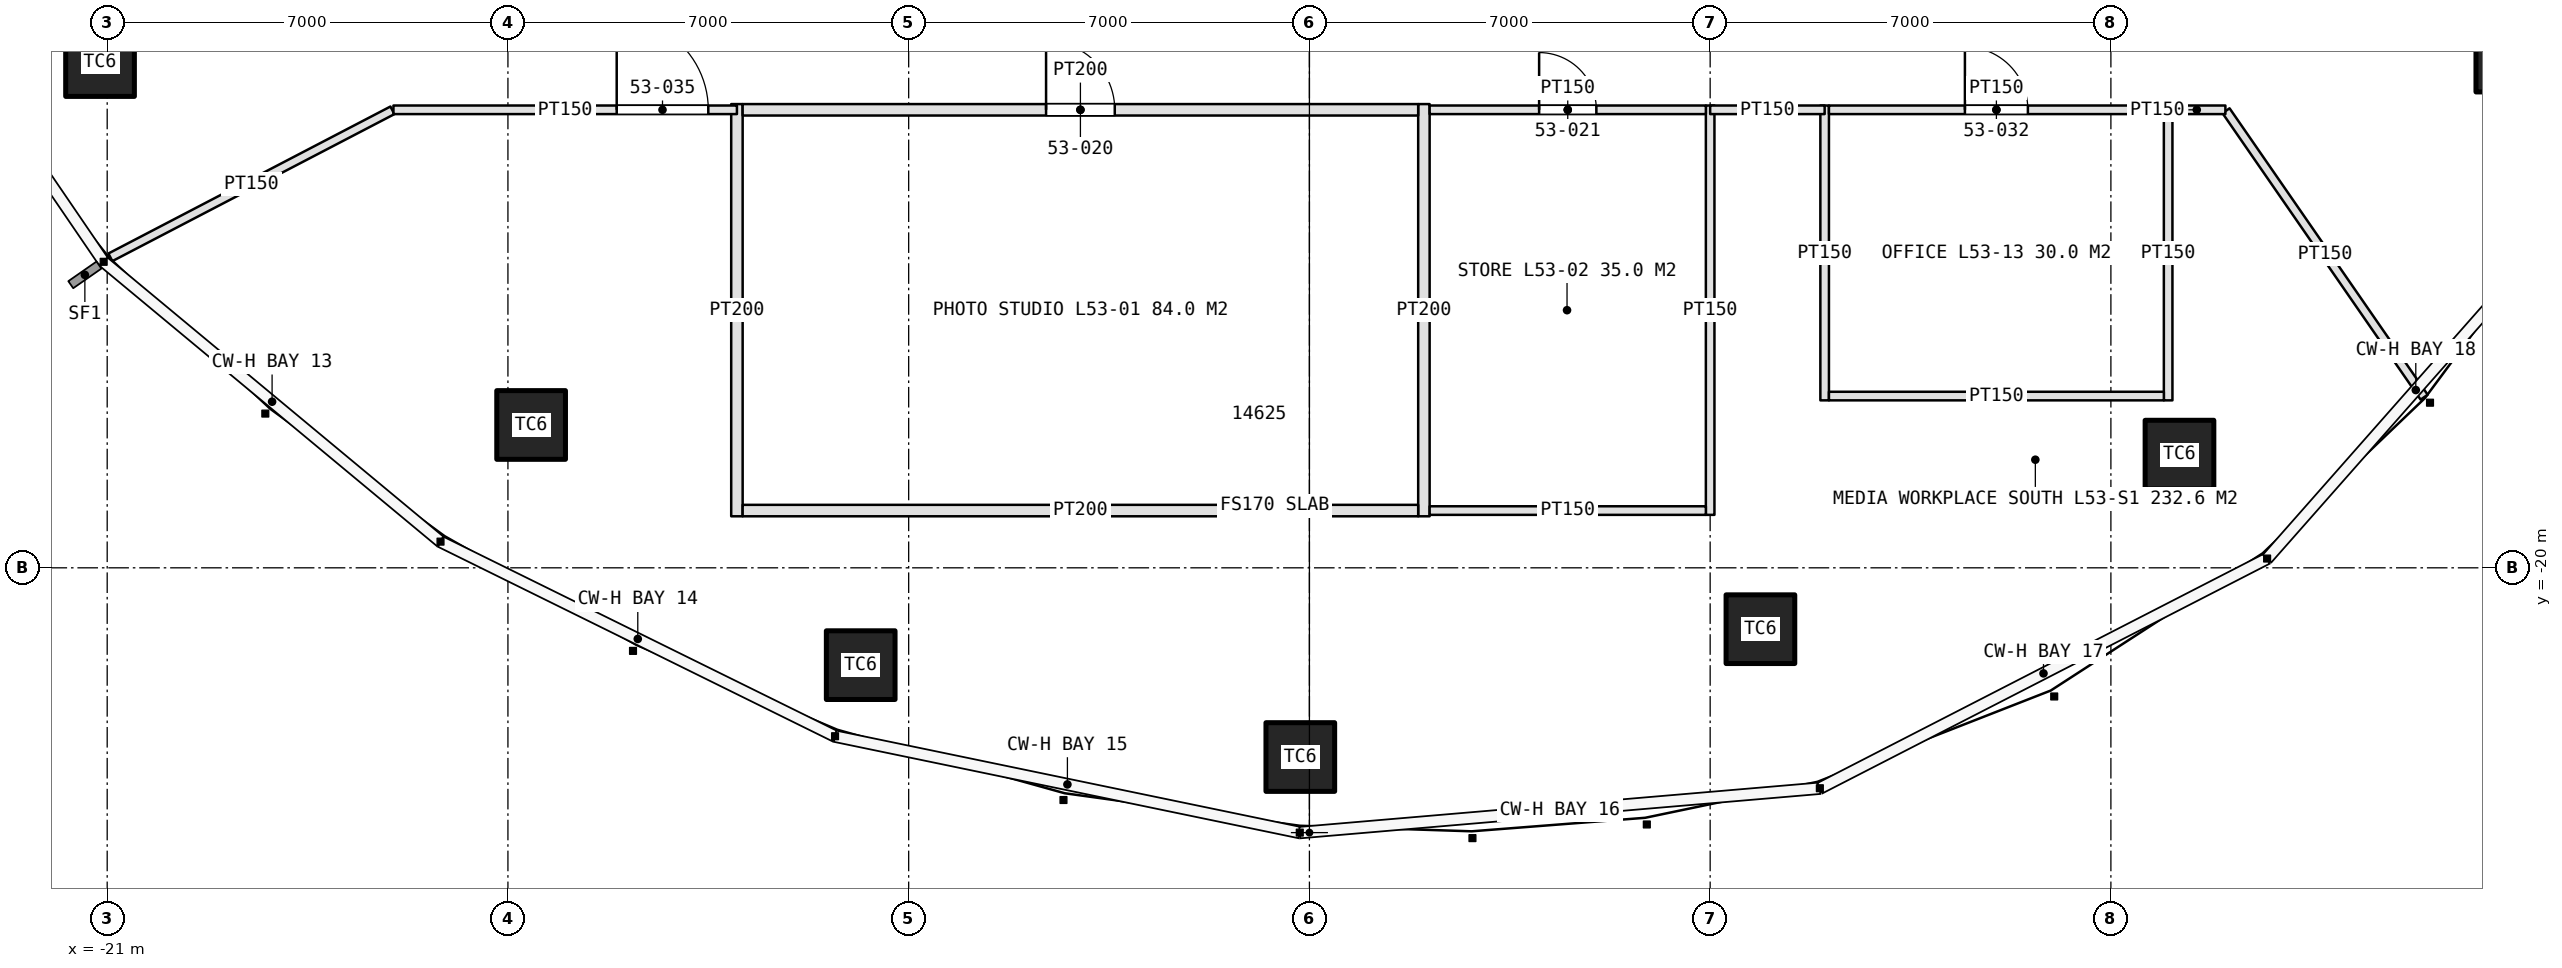
"""IFC4 building model, lengths in metres.
Left out: names, types, materials, properties, quantities, classifications, styles, units other than length and angle.
Written with IfcOpenShell. Run it as: python <this file> out.ifc"""

import sys

from ifc_helpers import new_model, si_unit, direction, frame, frame_2d, origin, origin_2d, place, context, subcontext, project, spatial, rectangle, extrude, element, fill, save


model = new_model("IFC4")
c1 = context("Model", 3, precision=1e-05, world=origin(), true_north=direction((0.0, 1.0)))
c2 = subcontext(c1, "Body", "Model", "MODEL_VIEW")
j1 = project(units=[si_unit("LENGTHUNIT", "METRE"), si_unit("PLANEANGLEUNIT", "RADIAN")], contexts=[c1])
p1 = place(None, origin())
s1 = spatial("IfcSite", under=j1, at=p1, CompositionType="ELEMENT")
p2 = place(p1, origin())
s2 = spatial("IfcBuilding", under=s1, at=p2, CompositionType="ELEMENT")
p3 = place(p2, frame((0.0, 0.0, 241.0)))
s3 = spatial("IfcBuildingStorey", under=s2, at=p3, CompositionType="ELEMENT", Elevation=241.0)
for number, where, z_axis, x_axis in (
    (1, (-21.125, -11.166, 0.0), (0.0, 0.0, 1.0), (1.0, 0.0, 0.0)),
    (2, (-13.595, -17.505, 0.0), (0.0, 0.0, 1.0), (1.0, 0.0, 0.0)),
    (3, (-7.838, -21.7, 0.0), (0.0, 0.0, 1.0), (1.0, 0.0, 0.0)),
    (4, (-0.159, -23.305, 0.0), (0.0, 0.0, 1.0), (1.0, 0.0, 0.0)),
    (5, (7.878, -21.072, 0.0), (0.0, 0.0, 1.0), (1.0, 0.0, 0.0)),
    (6, (15.198, -18.023, 0.0), (0.0, 0.0, 1.0), (1.0, 0.0, 0.0)),
    (7, (20.977, -11.088, 0.0), (0.0, 0.0, 1.0), (1.0, 0.0, 0.0)),
):
    element("IfcColumn", number, at=place(p3, frame(where, z_axis=z_axis, x_axis=x_axis)), inside=s3, PredefinedType="COLUMN", context=c2, shape_type="SweptSolid", body=[
        extrude(rectangle(XDim=1.2, YDim=1.2, at=origin_2d()), origin(), (0.0, 0.0, 1.0), 4.2),
    ])
for number, where, z_axis, x_axis in (
    (8, (-10.0, -11.9, 0.0), (0.0, 0.0, 1.0), (0.0, -1.0, 0.0)),
    (9, (2.0, -11.9, 0.0), (0.0, 0.0, 1.0), (0.0, -1.0, 0.0)),
):
    element("IfcWall", number, at=place(p3, frame(where, z_axis=z_axis, x_axis=x_axis)), inside=s3, PredefinedType="PARTITIONING", context=c2, shape_type="SweptSolid", body=[
        extrude(rectangle(XDim=7.2, YDim=0.2, at=frame_2d((3.6, 0.0))), origin(), (0.0, 0.0, 1.0), 3.0),
    ])
p4 = place(p3, frame((7.0, -11.925, 0.0), z_axis=(0.0, 0.0, 1.0), x_axis=(0.0, -1.0, 0.0)))
e10 = element("IfcWall", 10, at=p4, inside=s3, PredefinedType="PARTITIONING", context=c2, shape_type="SweptSolid", body=[
    extrude(rectangle(XDim=7.15, YDim=0.15, at=frame_2d((3.575, 0.0))), origin(), (0.0, 0.0, 1.0), 3.0),
])
p5 = place(p3, frame((-9.9, -12.0, 0.0), z_axis=(0.0, 0.0, 1.0), x_axis=(1.0, 0.0, 0.0)))
e11 = element("IfcWall", 11, at=p5, inside=s3, PredefinedType="PARTITIONING", context=c2, shape_type="SweptSolid", body=[
    extrude(rectangle(XDim=11.8, YDim=0.2, at=frame_2d((5.9, 0.0))), origin(), (0.0, 0.0, 1.0), 3.0),
])
p6 = place(p5, frame((5.3, 0.0, 0.0)))
e12 = element("IfcOpeningElement", 12, at=p6, cuts=e11, PredefinedType="OPENING", context=c2, shape_type="SweptSolid", body=[
    extrude(rectangle(XDim=1.2, YDim=2.4, at=frame_2d((0.6, 1.2))), frame((0.0, 0.11, 0.0), z_axis=(0.0, -1.0, 0.0), x_axis=(1.0, 0.0, 0.0)), (0.0, 0.0, 1.0), 0.22),
])
p7 = place(p3, frame((-9.9, -19.0, 0.0), z_axis=(0.0, 0.0, 1.0), x_axis=(1.0, 0.0, 0.0)))
e13 = element("IfcWall", 13, at=p7, inside=s3, PredefinedType="PARTITIONING", context=c2, shape_type="SweptSolid", body=[
    extrude(rectangle(XDim=11.8, YDim=0.2, at=frame_2d((5.9, 0.0))), origin(), (0.0, 0.0, 1.0), 3.0),
])
p8 = place(p3, frame((2.1, -12.0, 0.0), z_axis=(0.0, 0.0, 1.0), x_axis=(1.0, 0.0, 0.0)))
e14 = element("IfcWall", 14, at=p8, inside=s3, PredefinedType="PARTITIONING", context=c2, shape_type="SweptSolid", body=[
    extrude(rectangle(XDim=4.825, YDim=0.15, at=frame_2d((2.413, 0.0))), origin(), (0.0, 0.0, 1.0), 3.0),
])
p9 = place(p8, frame((1.913, 0.0, 0.0)))
e15 = element("IfcOpeningElement", 15, at=p9, cuts=e14, PredefinedType="OPENING", context=c2, shape_type="SweptSolid", body=[
    extrude(rectangle(XDim=1.0, YDim=2.2, at=frame_2d((0.5, 1.1))), frame((0.0, 0.085, 0.0), z_axis=(0.0, -1.0, 0.0), x_axis=(1.0, 0.0, 0.0)), (0.0, 0.0, 1.0), 0.17),
])
p10 = place(p3, frame((2.1, -19.0, 0.0), z_axis=(0.0, 0.0, 1.0), x_axis=(1.0, 0.0, 0.0)))
e16 = element("IfcWall", 16, at=p10, inside=s3, PredefinedType="PARTITIONING", context=c2, shape_type="SweptSolid", body=[
    extrude(rectangle(XDim=4.825, YDim=0.15, at=frame_2d((2.413, 0.0))), origin(), (0.0, 0.0, 1.0), 3.0),
])
for number, where, z_axis, x_axis in (
    (17, (9.0, -11.925, 0.0), (0.0, 0.0, 1.0), (0.0, -1.0, 0.0)),
    (18, (15.0, -11.925, 0.0), (0.0, 0.0, 1.0), (0.0, -1.0, 0.0)),
):
    element("IfcWall", number, at=place(p3, frame(where, z_axis=z_axis, x_axis=x_axis)), inside=s3, PredefinedType="PARTITIONING", context=c2, shape_type="SweptSolid", body=[
        extrude(rectangle(XDim=5.15, YDim=0.15, at=frame_2d((2.575, 0.0))), origin(), (0.0, 0.0, 1.0), 3.0),
    ])
p11 = place(p3, frame((9.075, -12.0, 0.0), z_axis=(0.0, 0.0, 1.0), x_axis=(1.0, 0.0, 0.0)))
e19 = element("IfcWall", 19, at=p11, inside=s3, PredefinedType="PARTITIONING", context=c2, shape_type="SweptSolid", body=[
    extrude(rectangle(XDim=5.85, YDim=0.15, at=frame_2d((2.925, 0.0))), origin(), (0.0, 0.0, 1.0), 3.0),
])
p12 = place(p11, frame((2.375, 0.0, 0.0)))
e20 = element("IfcOpeningElement", 20, at=p12, cuts=e19, PredefinedType="OPENING", context=c2, shape_type="SweptSolid", body=[
    extrude(rectangle(XDim=1.1, YDim=2.3, at=frame_2d((0.55, 1.15))), frame((0.0, 0.085, 0.0), z_axis=(0.0, -1.0, 0.0), x_axis=(1.0, 0.0, 0.0)), (0.0, 0.0, 1.0), 0.17),
])
p13 = place(p3, frame((9.075, -17.0, 0.0), z_axis=(0.0, 0.0, 1.0), x_axis=(1.0, 0.0, 0.0)))
e21 = element("IfcWall", 21, at=p13, inside=s3, PredefinedType="PARTITIONING", context=c2, shape_type="SweptSolid", body=[
    extrude(rectangle(XDim=5.85, YDim=0.15, at=frame_2d((2.925, 0.0))), origin(), (0.0, 0.0, 1.0), 3.0),
])
p14 = place(p3, frame((-16.018, -12.009, 0.0), z_axis=(0.0, 0.0, 1.0), x_axis=(-0.886831549241, -0.462092851351, 0.0)))
e22 = element("IfcWall", 22, at=p14, inside=s3, PredefinedType="PARTITIONING", context=c2, shape_type="SweptSolid", body=[
    extrude(rectangle(XDim=5.555, YDim=0.15, at=frame_2d((2.778, 0.0))), origin(), (0.0, 0.0, 1.0), 3.0),
])
p15 = place(p3, frame((16.011, -12.016, 0.0), z_axis=(0.0, 0.0, 1.0), x_axis=(0.568863489071, -0.822431961199, 0.0)))
e23 = element("IfcWall", 23, at=p15, inside=s3, PredefinedType="PARTITIONING", context=c2, shape_type="SweptSolid", body=[
    extrude(rectangle(XDim=6.083, YDim=0.15, at=frame_2d((3.042, 0.0))), origin(), (0.0, 0.0, 1.0), 3.0),
])
p16 = place(p3, frame((-16.0, -12.0, 0.0), z_axis=(0.0, 0.0, 1.0), x_axis=(1.0, 0.0, 0.0)))
e24 = element("IfcWall", 24, at=p16, inside=s3, PredefinedType="PARTITIONING", context=c2, shape_type="SweptSolid", body=[
    extrude(rectangle(XDim=6.0, YDim=0.15, at=frame_2d((3.0, 0.0))), origin(), (0.0, 0.0, 1.0), 3.0),
])
p17 = place(p16, frame((3.9, 0.0, 0.0)))
e25 = element("IfcOpeningElement", 25, at=p17, cuts=e24, PredefinedType="OPENING", context=c2, shape_type="SweptSolid", body=[
    extrude(rectangle(XDim=1.6, YDim=2.4, at=frame_2d((0.8, 1.2))), frame((0.0, 0.085, 0.0), z_axis=(0.0, -1.0, 0.0), x_axis=(1.0, 0.0, 0.0)), (0.0, 0.0, 1.0), 0.17),
])
p18 = place(p3, frame((7.0, -12.0, 0.0), z_axis=(0.0, 0.0, 1.0), x_axis=(1.0, 0.0, 0.0)))
e26 = element("IfcWall", 26, at=p18, inside=s3, PredefinedType="PARTITIONING", context=c2, shape_type="SweptSolid", body=[
    extrude(rectangle(XDim=2.0, YDim=0.15, at=frame_2d((1.0, 0.0))), origin(), (0.0, 0.0, 1.0), 3.0),
])
p19 = place(p3, frame((15.0, -12.0, 0.0), z_axis=(0.0, 0.0, 1.0), x_axis=(1.0, 0.0, 0.0)))
e27 = element("IfcWall", 27, at=p19, inside=s3, PredefinedType="PARTITIONING", context=c2, shape_type="SweptSolid", body=[
    extrude(rectangle(XDim=1.0, YDim=0.15, at=frame_2d((0.5, 0.0))), origin(), (0.0, 0.0, 1.0), 3.0),
])
p20 = place(p6, origin())
e28 = element("IfcDoor", 28, at=p20, inside=s3, OperationType="SINGLE_SWING_LEFT", PredefinedType="DOOR", context=c2, shape_type="SweptSolid", body=[
    extrude(rectangle(XDim=1.2, YDim=2.4, at=frame_2d((0.6, 1.2))), frame((0.0, 0.025, 0.0), z_axis=(0.0, -1.0, 0.0), x_axis=(1.0, 0.0, 0.0)), (0.0, 0.0, 1.0), 0.05),
])
fill(e12, e28)
p21 = place(p9, origin())
e29 = element("IfcDoor", 29, at=p21, inside=s3, OperationType="SINGLE_SWING_LEFT", PredefinedType="DOOR", context=c2, shape_type="SweptSolid", body=[
    extrude(rectangle(XDim=1.0, YDim=2.2, at=frame_2d((0.5, 1.1))), frame((0.0, 0.025, 0.0), z_axis=(0.0, -1.0, 0.0), x_axis=(1.0, 0.0, 0.0)), (0.0, 0.0, 1.0), 0.05),
])
fill(e15, e29)
p22 = place(p12, origin())
e30 = element("IfcDoor", 30, at=p22, inside=s3, OperationType="SINGLE_SWING_LEFT", PredefinedType="DOOR", context=c2, shape_type="SweptSolid", body=[
    extrude(rectangle(XDim=1.1, YDim=2.3, at=frame_2d((0.55, 1.15))), frame((0.0, 0.025, 0.0), z_axis=(0.0, -1.0, 0.0), x_axis=(1.0, 0.0, 0.0)), (0.0, 0.0, 1.0), 0.05),
])
fill(e20, e30)
p23 = place(p17, origin())
e31 = element("IfcDoor", 31, at=p23, inside=s3, OperationType="DOUBLE_DOOR_SINGLE_SWING", PredefinedType="DOOR", context=c2, shape_type="SweptSolid", body=[
    extrude(rectangle(XDim=1.6, YDim=2.4, at=frame_2d((0.8, 1.2))), frame((0.0, 0.025, 0.0), z_axis=(0.0, -1.0, 0.0), x_axis=(1.0, 0.0, 0.0)), (0.0, 0.0, 1.0), 0.05),
])
fill(e25, e31)
save(model, sys.argv[1])
